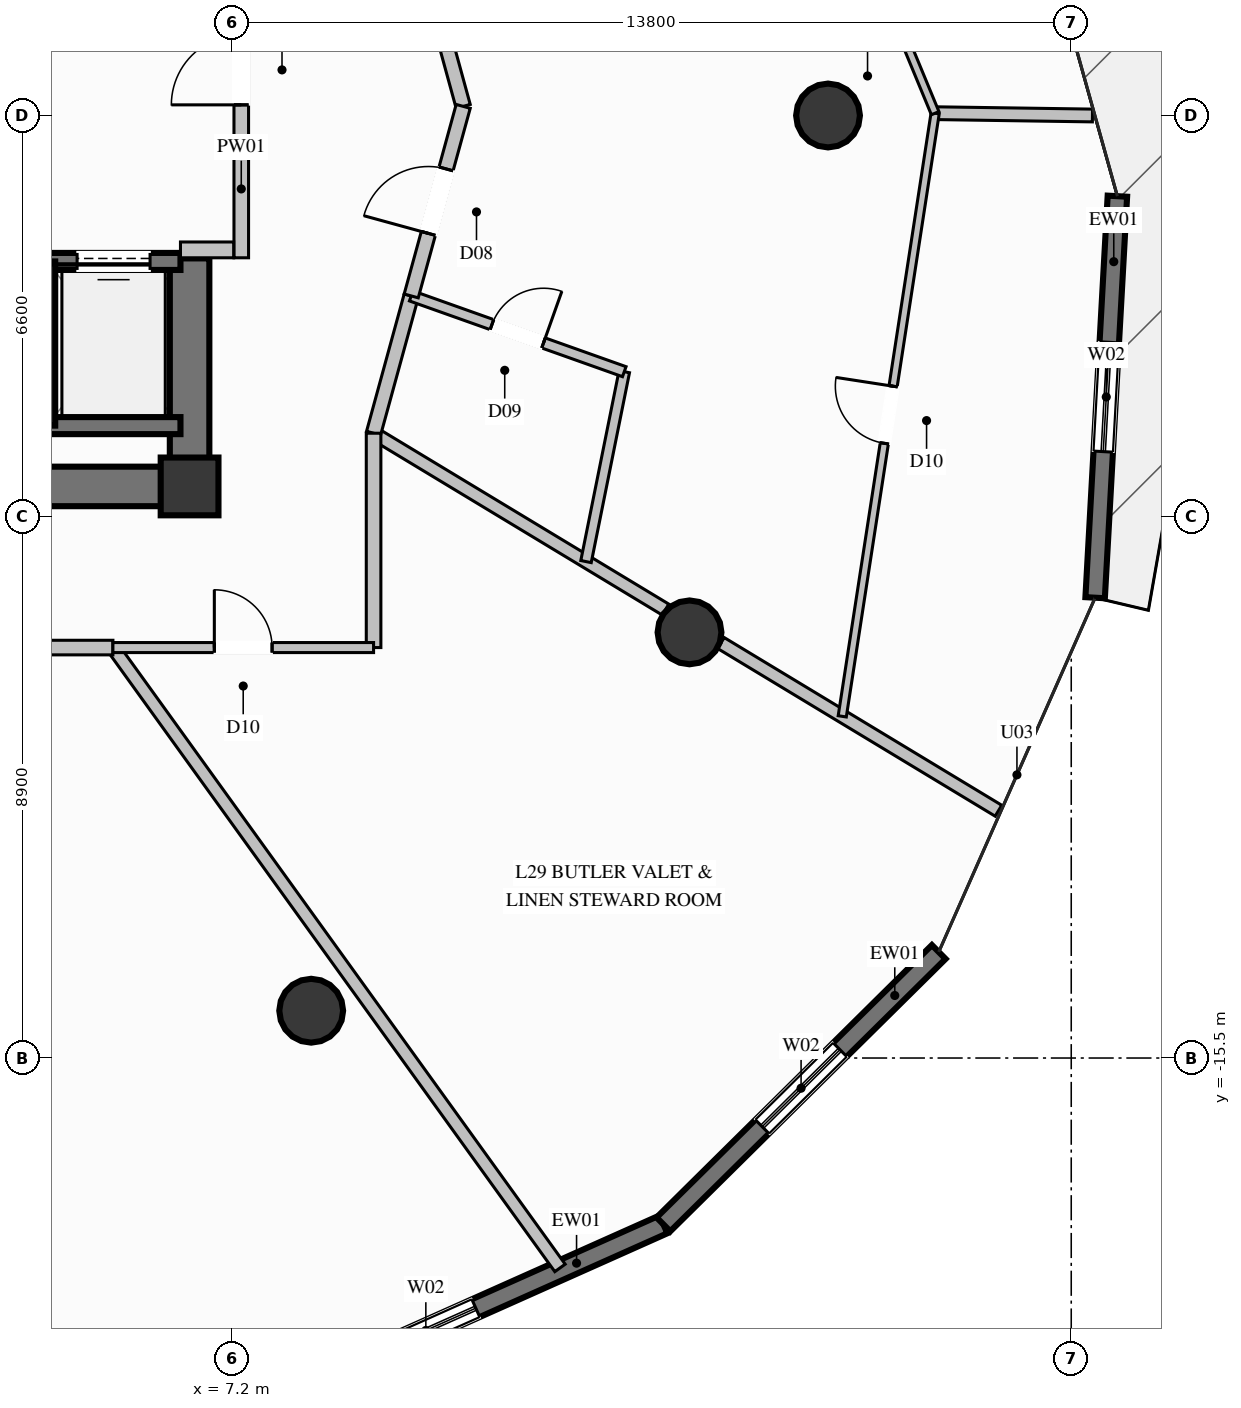
"""IFC4 building model, lengths in metres.
Left out: names, types, materials, properties, quantities, classifications, styles, units other than length and angle.
Written with IfcOpenShell. Run it as: python <this file> out.ifc"""

import sys

from ifc_helpers import new_model, si_unit, direction, frame, frame_2d, origin, origin_2d, place, context, subcontext, project, spatial, rectangle, circle, extrude, element, fill, save


model = new_model("IFC4")
c1 = context("Model", 3, precision=1e-05, world=origin(), true_north=direction((0.0, 1.0)))
c2 = subcontext(c1, "Body", "Model", "MODEL_VIEW")
j1 = project(units=[si_unit("LENGTHUNIT", "METRE"), si_unit("PLANEANGLEUNIT", "RADIAN")], contexts=[c1])
p1 = place(None, origin())
s1 = spatial("IfcSite", under=j1, at=p1, CompositionType="ELEMENT")
p2 = place(p1, origin())
s2 = spatial("IfcBuilding", under=s1, at=p2, CompositionType="ELEMENT")
p3 = place(p2, frame((0.0, 0.0, 117.0)))
s3 = spatial("IfcBuildingStorey", under=s2, at=p3, CompositionType="ELEMENT", Elevation=117.0)
p4 = place(p3, frame((6.5, -6.1, 0.0), z_axis=(0.0, 0.0, 1.0), x_axis=(1.0, 0.0, 0.0)))
e1 = element("IfcColumn", 1, at=p4, inside=s3, PredefinedType="COLUMN", context=c2, shape_type="SweptSolid", body=[
    extrude(rectangle(XDim=0.95, YDim=0.95, at=origin_2d()), origin(), (0.0, 0.0, 1.0), 3.6),
])
p5 = place(p3, frame((4.15, -6.1, 0.0), z_axis=(0.0, 0.0, 1.0), x_axis=(1.0, 0.0, 0.0)))
e2 = element("IfcWall", 2, at=p5, inside=s3, PredefinedType="SHEAR", context=c2, shape_type="SweptSolid", body=[
    extrude(rectangle(XDim=2.025, YDim=0.65, at=frame_2d((1.013, 0.0))), origin(), (0.0, 0.0, 1.0), 3.6),
])
p6 = place(p3, frame((6.5, -6.425, 0.0), z_axis=(0.0, 0.0, 1.0), x_axis=(0.0, 1.0, 0.0)))
e3 = element("IfcWall", 3, at=p6, inside=s3, PredefinedType="SHEAR", context=c2, shape_type="SweptSolid", body=[
    extrude(rectangle(XDim=4.075, YDim=0.65, at=frame_2d((2.038, 0.0))), origin(), (0.0, 0.0, 1.0), 3.6),
])
for number, where, z_axis, x_axis in (
    (4, (17.0, 0.0, 0.0), (0.0, 0.0, 1.0), (1.0, 0.0, 0.0)),
    (5, (8.5, -14.722, 0.0), (0.0, 0.0, 1.0), (1.0, 0.0, 0.0)),
    (6, (14.722, -8.5, 0.0), (0.0, 0.0, 1.0), (1.0, 0.0, 0.0)),
):
    element("IfcColumn", number, at=place(p3, frame(where, z_axis=z_axis, x_axis=x_axis)), inside=s3, PredefinedType="COLUMN", context=c2, shape_type="SweptSolid", body=[
        extrude(circle(Radius=0.525, at=origin_2d()), origin(), (0.0, 0.0, 1.0), 3.6),
    ])
p7 = place(p3, frame((21.759, -1.327, 0.0), z_axis=(0.0, 0.0, 1.0), x_axis=(-0.055339161213, -0.998467614516, 0.0)))
e7 = element("IfcWall", 7, at=p7, inside=s3, PredefinedType="SOLIDWALL", context=c2, shape_type="SweptSolid", body=[
    extrude(rectangle(XDim=6.613, YDim=0.32, at=frame_2d((3.307, 0.0))), origin(), (0.0, 0.0, 1.0), 3.35),
])
p8 = place(p7, frame((2.407, 0.0, 0.35)))
e8 = element("IfcOpeningElement", 8, at=p8, cuts=e7, PredefinedType="OPENING", context=c2, shape_type="SweptSolid", body=[
    extrude(rectangle(XDim=1.8, YDim=2.6, at=frame_2d((0.9, 1.3))), frame((0.0, 0.17, 0.0), z_axis=(0.0, -1.0, 0.0), x_axis=(1.0, 0.0, 0.0)), (0.0, 0.0, 1.0), 0.34),
])
p9 = place(p3, frame((14.293, -18.236, 0.0), z_axis=(0.0, 0.0, 1.0), x_axis=(-0.913180092106, -0.407556277562, 0.0)))
e9 = element("IfcWall", 9, at=p9, inside=s3, PredefinedType="SOLIDWALL", context=c2, shape_type="SweptSolid", body=[
    extrude(rectangle(XDim=6.612, YDim=0.32, at=frame_2d((3.306, 0.0))), origin(), (0.0, 0.0, 1.0), 3.35),
])
p10 = place(p9, frame((3.379, 0.0, 0.35)))
e10 = element("IfcOpeningElement", 10, at=p10, cuts=e9, PredefinedType="OPENING", context=c2, shape_type="SweptSolid", body=[
    extrude(rectangle(XDim=1.8, YDim=2.6, at=frame_2d((0.9, 1.3))), frame((0.0, 0.17, 0.0), z_axis=(0.0, -1.0, 0.0), x_axis=(1.0, 0.0, 0.0)), (0.0, 0.0, 1.0), 0.34),
])
p11 = place(p3, frame((18.821, -13.756, 0.0), z_axis=(0.0, 0.0, 1.0), x_axis=(-0.710872024536, -0.703321380829, 0.0)))
e11 = element("IfcWall", 11, at=p11, inside=s3, PredefinedType="SOLIDWALL", context=c2, shape_type="SweptSolid", body=[
    extrude(rectangle(XDim=6.37, YDim=0.32, at=frame_2d((3.185, 0.0))), origin(), (0.0, 0.0, 1.0), 3.35),
])
p12 = place(p11, frame((2.285, 0.0, 0.35)))
e12 = element("IfcOpeningElement", 12, at=p12, cuts=e11, PredefinedType="OPENING", context=c2, shape_type="SweptSolid", body=[
    extrude(rectangle(XDim=1.8, YDim=2.6, at=frame_2d((0.9, 1.3))), frame((0.0, 0.17, 0.0), z_axis=(0.0, -1.0, 0.0), x_axis=(1.0, 0.0, 0.0)), (0.0, 0.0, 1.0), 0.34),
])
p13 = place(p3, frame((4.15, -5.1, 0.0), z_axis=(0.0, 0.0, 1.0), x_axis=(1.0, 0.0, 0.0)))
e13 = element("IfcWall", 13, at=p13, inside=s3, PredefinedType="SOLIDWALL", context=c2, shape_type="SweptSolid", body=[
    extrude(rectangle(XDim=2.2, YDim=0.28, at=frame_2d((1.1, 0.0))), origin(), (0.0, 0.0, 1.0), 3.35),
])
p14 = place(p3, frame((6.35, -2.4, 0.0), z_axis=(0.0, 0.0, 1.0), x_axis=(-1.0, 0.0, 0.0)))
e14 = element("IfcWall", 14, at=p14, inside=s3, PredefinedType="SOLIDWALL", context=c2, shape_type="SweptSolid", body=[
    extrude(rectangle(XDim=2.2, YDim=0.28, at=frame_2d((1.1, 0.0))), origin(), (0.0, 0.0, 1.0), 3.35),
])
p15 = place(p14, frame((0.5, 0.0, 0.0)))
e15 = element("IfcOpeningElement", 15, at=p15, cuts=e14, PredefinedType="OPENING", context=c2, shape_type="SweptSolid", body=[
    extrude(rectangle(XDim=1.2, YDim=2.2, at=frame_2d((0.6, 1.1))), frame((0.0, 0.15, 0.0), z_axis=(0.0, -1.0, 0.0), x_axis=(1.0, 0.0, 0.0)), (0.0, 0.0, 1.0), 0.3),
])
p16 = place(p3, frame((4.15, -2.4, 0.0), z_axis=(0.0, 0.0, 1.0), x_axis=(0.0, -1.0, 0.0)))
e16 = element("IfcWall", 16, at=p16, inside=s3, PredefinedType="SOLIDWALL", context=c2, shape_type="SweptSolid", body=[
    extrude(rectangle(XDim=2.7, YDim=0.28, at=frame_2d((1.35, 0.0))), origin(), (0.0, 0.0, 1.0), 3.35),
])
p17 = place(p3, frame((7.35, -2.34, 0.0), z_axis=(0.0, 0.0, 1.0), x_axis=(0.0, 1.0, 0.0)))
e17 = element("IfcWall", 17, at=p17, inside=s3, PredefinedType="PARTITIONING", context=c2, shape_type="SweptSolid", body=[
    extrude(rectangle(XDim=5.02, YDim=0.24, at=frame_2d((2.51, 0.0))), origin(), (0.0, 0.0, 1.0), 2.435),
])
p18 = place(p17, frame((2.515, 0.0, 0.0)))
e18 = element("IfcOpeningElement", 18, at=p18, cuts=e17, PredefinedType="OPENING", context=c2, shape_type="SweptSolid", body=[
    extrude(rectangle(XDim=1.15, YDim=2.2, at=frame_2d((0.575, 1.1))), frame((0.0, 0.13, 0.0), z_axis=(0.0, -1.0, 0.0), x_axis=(1.0, 0.0, 0.0)), (0.0, 0.0, 1.0), 0.26),
])
p19 = place(p3, frame((6.35, -2.21, 0.0), z_axis=(0.0, 0.0, 1.0), x_axis=(1.0, 0.0, 0.0)))
e19 = element("IfcWall", 19, at=p19, inside=s3, PredefinedType="PARTITIONING", context=c2, shape_type="SweptSolid", body=[
    extrude(rectangle(XDim=0.875, YDim=0.26, at=frame_2d((0.438, 0.0))), origin(), (0.0, 0.0, 1.0), 3.35),
])
p20 = place(p3, frame((9.526, -5.225, 0.0), z_axis=(0.0, 0.0, 1.0), x_axis=(0.855972129744, -0.517021965782, 0.0)))
e20 = element("IfcWall", 20, at=p20, inside=s3, PredefinedType="PARTITIONING", context=c2, shape_type="SweptSolid", body=[
    extrude(rectangle(XDim=5.609, YDim=0.21, at=frame_2d((2.804, 0.0))), origin(), (0.0, 0.0, 1.0), 2.791),
])
p21 = place(p3, frame((15.238, -8.675, 0.0), z_axis=(0.0, 0.0, 1.0), x_axis=(0.855909632561, -0.51712542085, 0.0)))
e21 = element("IfcWall", 21, at=p21, inside=s3, PredefinedType="PARTITIONING", context=c2, shape_type="SweptSolid", body=[
    extrude(rectangle(XDim=5.333, YDim=0.21, at=frame_2d((2.667, 0.0))), origin(), (0.0, 0.0, 1.0), 3.35),
])
p22 = place(p3, frame((9.526, -5.225, 0.0), z_axis=(0.0, 0.0, 1.0), x_axis=(0.264431780812, 0.964404393031, 0.0)))
e22 = element("IfcWall", 22, at=p22, inside=s3, PredefinedType="PARTITIONING", context=c2, shape_type="SweptSolid", body=[
    extrude(rectangle(XDim=2.341, YDim=0.24, at=frame_2d((1.171, 0.0))), origin(), (0.0, 0.0, 1.0), 3.35),
])
p23 = place(p3, frame((13.02, -7.336, 0.0), z_axis=(0.0, 0.0, 1.0), x_axis=(0.197412870908, 0.980320436592, 0.0)))
e23 = element("IfcWall", 23, at=p23, inside=s3, PredefinedType="PLUMBINGWALL", context=c2, shape_type="SweptSolid", body=[
    extrude(rectangle(XDim=3.186, YDim=0.175, at=frame_2d((1.593, 0.0))), origin(), (0.0, 0.0, 1.0), 3.35),
])
p24 = place(p3, frame((10.145, -2.967, 0.0), z_axis=(0.0, 0.0, 1.0), x_axis=(0.942213308765, -0.335013553137, 0.0)))
e24 = element("IfcWall", 24, at=p24, inside=s3, PredefinedType="PLUMBINGWALL", context=c2, shape_type="SweptSolid", body=[
    extrude(rectangle(XDim=3.719, YDim=0.175, at=frame_2d((1.859, 0.0))), origin(), (0.0, 0.0, 1.0), 3.35),
])
p25 = place(p24, frame((1.409, 0.0, 0.0)))
e25 = element("IfcOpeningElement", 25, at=p25, cuts=e24, PredefinedType="OPENING", context=c2, shape_type="SweptSolid", body=[
    extrude(rectangle(XDim=0.9, YDim=2.1, at=frame_2d((0.45, 1.05))), frame((0.0, 0.098, 0.0), z_axis=(0.0, -1.0, 0.0), x_axis=(1.0, 0.0, 0.0)), (0.0, 0.0, 1.0), 0.195),
])
p26 = place(p3, frame((18.762, 0.038, 0.0), z_axis=(0.0, 0.0, 1.0), x_axis=(0.999891661517, -0.014719552628, 0.0)))
e26 = element("IfcWall", 26, at=p26, inside=s3, PredefinedType="PARTITIONING", context=c2, shape_type="SweptSolid", body=[
    extrude(rectangle(XDim=2.587, YDim=0.21, at=frame_2d((1.294, 0.0))), origin(), (0.0, 0.0, 1.0), 3.35),
])
p27 = place(p3, frame((11.0, 0.15, 0.0), z_axis=(0.0, 0.0, 1.0), x_axis=(-0.264488542062, 0.964388827765, 0.0)))
e27 = element("IfcWall", 27, at=p27, inside=s3, PredefinedType="PARTITIONING", context=c2, shape_type="SweptSolid", body=[
    extrude(rectangle(XDim=5.573, YDim=0.24, at=frame_2d((2.787, 0.0))), origin(), (0.0, 0.0, 1.0), 2.985),
])
p28 = place(p3, frame((10.145, -2.967, 0.0), z_axis=(0.0, 0.0, 1.0), x_axis=(0.264529660797, 0.9643775498, 0.0)))
e28 = element("IfcWall", 28, at=p28, inside=s3, PredefinedType="PARTITIONING", context=c2, shape_type="SweptSolid", body=[
    extrude(rectangle(XDim=3.232, YDim=0.24, at=frame_2d((1.616, 0.0))), origin(), (0.0, 0.0, 1.0), 2.985),
])
p29 = place(p28, frame((1.066, 0.0, 0.0)))
e29 = element("IfcOpeningElement", 29, at=p29, cuts=e28, PredefinedType="OPENING", context=c2, shape_type="SweptSolid", body=[
    extrude(rectangle(XDim=1.1, YDim=2.3, at=frame_2d((0.55, 1.15))), frame((0.0, 0.13, 0.0), z_axis=(0.0, -1.0, 0.0), x_axis=(1.0, 0.0, 0.0)), (0.0, 0.0, 1.0), 0.26),
])
p30 = place(p3, frame((17.234, -9.881, 0.0), z_axis=(0.0, 0.0, 1.0), x_axis=(0.152256429378, 0.988341023996, 0.0)))
e30 = element("IfcWall", 30, at=p30, inside=s3, PredefinedType="PARTITIONING", context=c2, shape_type="SweptSolid", body=[
    extrude(rectangle(XDim=10.036, YDim=0.135, at=frame_2d((5.018, 0.0))), origin(), (0.0, 0.0, 1.0), 3.35),
])
p31 = place(p30, frame((4.543, 0.0, 0.0)))
e31 = element("IfcOpeningElement", 31, at=p31, cuts=e30, PredefinedType="OPENING", context=c2, shape_type="SweptSolid", body=[
    extrude(rectangle(XDim=0.95, YDim=2.1, at=frame_2d((0.475, 1.05))), frame((0.0, 0.078, 0.0), z_axis=(0.0, -1.0, 0.0), x_axis=(1.0, 0.0, 0.0)), (0.0, 0.0, 1.0), 0.155),
])
p32 = place(p3, frame((18.762, 0.038, 0.0), z_axis=(0.0, 0.0, 1.0), x_axis=(-0.382615379706, 0.923907717909, 0.0)))
e32 = element("IfcWall", 32, at=p32, inside=s3, PredefinedType="PARTITIONING", context=c2, shape_type="SweptSolid", body=[
    extrude(rectangle(XDim=9.435, YDim=0.135, at=frame_2d((4.717, 0.0))), origin(), (0.0, 0.0, 1.0), 2.877),
])
p33 = place(p32, frame((4.242, 0.0, 0.0)))
e33 = element("IfcOpeningElement", 33, at=p33, cuts=e32, PredefinedType="OPENING", context=c2, shape_type="SweptSolid", body=[
    extrude(rectangle(XDim=0.95, YDim=2.1, at=frame_2d((0.475, 1.05))), frame((0.0, 0.078, 0.0), z_axis=(0.0, -1.0, 0.0), x_axis=(1.0, 0.0, 0.0)), (0.0, 0.0, 1.0), 0.155),
])
p34 = place(p3, frame((5.239, -8.75, 0.0), z_axis=(0.0, 0.0, 1.0), x_axis=(0.584705614476, -0.811245551236, 0.0)))
e34 = element("IfcWall", 34, at=p34, inside=s3, PredefinedType="PARTITIONING", context=c2, shape_type="SweptSolid", body=[
    extrude(rectangle(XDim=12.576, YDim=0.21, at=frame_2d((6.288, 0.0))), origin(), (0.0, 0.0, 1.0), 3.35),
])
p35 = place(p3, frame((0.0, -8.75, 0.0), z_axis=(0.0, 0.0, 1.0), x_axis=(1.0, 0.0, 0.0)))
e35 = element("IfcWall", 35, at=p35, inside=s3, PredefinedType="PARTITIONING", context=c2, shape_type="SweptSolid", body=[
    extrude(rectangle(XDim=5.239, YDim=0.24, at=frame_2d((2.62, 0.0))), origin(), (0.0, 0.0, 1.0), 3.35),
])
p36 = place(p3, frame((9.526, -8.75, 0.0), z_axis=(0.0, 0.0, 1.0), x_axis=(0.0, 1.0, 0.0)))
e36 = element("IfcWall", 36, at=p36, inside=s3, PredefinedType="PARTITIONING", context=c2, shape_type="SweptSolid", body=[
    extrude(rectangle(XDim=3.525, YDim=0.24, at=frame_2d((1.762, 0.0))), origin(), (0.0, 0.0, 1.0), 3.35),
])
p37 = place(p3, frame((5.239, -8.75, 0.0), z_axis=(0.0, 0.0, 1.0), x_axis=(1.0, 0.0, 0.0)))
e37 = element("IfcWall", 37, at=p37, inside=s3, PredefinedType="PARTITIONING", context=c2, shape_type="SweptSolid", body=[
    extrude(rectangle(XDim=4.287, YDim=0.165, at=frame_2d((2.144, 0.0))), origin(), (0.0, 0.0, 1.0), 3.35),
])
p38 = place(p37, frame((1.668, 0.0, 0.0)))
e38 = element("IfcOpeningElement", 38, at=p38, cuts=e37, PredefinedType="OPENING", context=c2, shape_type="SweptSolid", body=[
    extrude(rectangle(XDim=0.95, YDim=2.1, at=frame_2d((0.475, 1.05))), frame((0.0, 0.093, 0.0), z_axis=(0.0, -1.0, 0.0), x_axis=(1.0, 0.0, 0.0)), (0.0, 0.0, 1.0), 0.185),
])
p39 = place(p8, origin())
e39 = element("IfcWindow", 39, at=p39, inside=s3, PartitioningType="SINGLE_PANEL", PredefinedType="WINDOW", context=c2, shape_type="SweptSolid", body=[
    extrude(rectangle(XDim=1.8, YDim=2.6, at=frame_2d((0.9, 1.3))), frame((0.0, 0.03, 0.0), z_axis=(0.0, -1.0, 0.0), x_axis=(1.0, 0.0, 0.0)), (0.0, 0.0, 1.0), 0.06),
])
fill(e8, e39)
p40 = place(p10, origin())
e40 = element("IfcWindow", 40, at=p40, inside=s3, PartitioningType="SINGLE_PANEL", PredefinedType="WINDOW", context=c2, shape_type="SweptSolid", body=[
    extrude(rectangle(XDim=1.8, YDim=2.6, at=frame_2d((0.9, 1.3))), frame((0.0, 0.03, 0.0), z_axis=(0.0, -1.0, 0.0), x_axis=(1.0, 0.0, 0.0)), (0.0, 0.0, 1.0), 0.06),
])
fill(e10, e40)
p41 = place(p12, origin())
e41 = element("IfcWindow", 41, at=p41, inside=s3, PartitioningType="SINGLE_PANEL", PredefinedType="WINDOW", context=c2, shape_type="SweptSolid", body=[
    extrude(rectangle(XDim=1.8, YDim=2.6, at=frame_2d((0.9, 1.3))), frame((0.0, 0.03, 0.0), z_axis=(0.0, -1.0, 0.0), x_axis=(1.0, 0.0, 0.0)), (0.0, 0.0, 1.0), 0.06),
])
fill(e12, e41)
p42 = place(p15, origin())
e42 = element("IfcDoor", 42, at=p42, inside=s3, OperationType="SLIDING_TO_LEFT", PredefinedType="DOOR", context=c2, shape_type="SweptSolid", body=[
    extrude(rectangle(XDim=1.2, YDim=2.2, at=frame_2d((0.6, 1.1))), frame((0.0, 0.025, 0.0), z_axis=(0.0, -1.0, 0.0), x_axis=(1.0, 0.0, 0.0)), (0.0, 0.0, 1.0), 0.05),
])
fill(e15, e42)
p43 = place(p18, origin())
e43 = element("IfcDoor", 43, at=p43, inside=s3, OperationType="SINGLE_SWING_LEFT", PredefinedType="DOOR", context=c2, shape_type="SweptSolid", body=[
    extrude(rectangle(XDim=1.15, YDim=2.2, at=frame_2d((0.575, 1.1))), frame((0.0, 0.025, 0.0), z_axis=(0.0, -1.0, 0.0), x_axis=(1.0, 0.0, 0.0)), (0.0, 0.0, 1.0), 0.05),
])
fill(e18, e43)
p44 = place(p25, origin())
e44 = element("IfcDoor", 44, at=p44, inside=s3, OperationType="SINGLE_SWING_RIGHT", PredefinedType="DOOR", context=c2, shape_type="SweptSolid", body=[
    extrude(rectangle(XDim=0.9, YDim=2.1, at=frame_2d((0.45, 1.05))), frame((0.0, 0.025, 0.0), z_axis=(0.0, -1.0, 0.0), x_axis=(1.0, 0.0, 0.0)), (0.0, 0.0, 1.0), 0.05),
])
fill(e25, e44)
p45 = place(p29, origin())
e45 = element("IfcDoor", 45, at=p45, inside=s3, OperationType="SINGLE_SWING_LEFT", PredefinedType="DOOR", context=c2, shape_type="SweptSolid", body=[
    extrude(rectangle(XDim=1.1, YDim=2.3, at=frame_2d((0.55, 1.15))), frame((0.0, 0.025, 0.0), z_axis=(0.0, -1.0, 0.0), x_axis=(1.0, 0.0, 0.0)), (0.0, 0.0, 1.0), 0.05),
])
fill(e29, e45)
p46 = place(p31, origin())
e46 = element("IfcDoor", 46, at=p46, inside=s3, OperationType="SINGLE_SWING_RIGHT", PredefinedType="DOOR", context=c2, shape_type="SweptSolid", body=[
    extrude(rectangle(XDim=0.95, YDim=2.1, at=frame_2d((0.475, 1.05))), frame((0.0, 0.025, 0.0), z_axis=(0.0, -1.0, 0.0), x_axis=(1.0, 0.0, 0.0)), (0.0, 0.0, 1.0), 0.05),
])
fill(e31, e46)
p47 = place(p38, origin())
e47 = element("IfcDoor", 47, at=p47, inside=s3, OperationType="SINGLE_SWING_LEFT", PredefinedType="DOOR", context=c2, shape_type="SweptSolid", body=[
    extrude(rectangle(XDim=0.95, YDim=2.1, at=frame_2d((0.475, 1.05))), frame((0.0, 0.025, 0.0), z_axis=(0.0, -1.0, 0.0), x_axis=(1.0, 0.0, 0.0)), (0.0, 0.0, 1.0), 0.05),
])
fill(e38, e47)
save(model, sys.argv[1])
